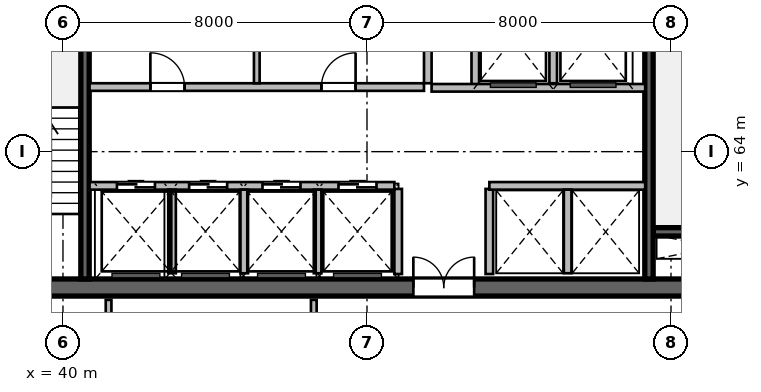
"""IFC4 building model, lengths in metres.
Left out: names, types, materials, properties, quantities, classifications, styles, units other than length and angle.
Written with IfcOpenShell. Run it as: python <this file> out.ifc"""

import sys

from ifc_helpers import new_model, si_unit, direction, frame, frame_2d, origin, place, context, subcontext, project, spatial, rectangle, extrude, source, transform, mapped, element, fill, save


model = new_model("IFC4")
c1 = context("Model", 3, precision=1e-05, world=origin(), true_north=direction((0.0, 1.0)))
c2 = subcontext(c1, "Body", "Model", "MODEL_VIEW")
j1 = project(units=[si_unit("LENGTHUNIT", "METRE"), si_unit("PLANEANGLEUNIT", "RADIAN")], contexts=[c1])
p1 = place(None, origin())
s1 = spatial("IfcSite", under=j1, at=p1, CompositionType="ELEMENT")
p2 = place(p1, origin())
s2 = spatial("IfcBuilding", under=s1, at=p2, CompositionType="ELEMENT")
p3 = place(p2, frame((0.0, 0.0, 246.9)))
s3 = spatial("IfcBuildingStorey", under=s2, at=p3, CompositionType="ELEMENT", Elevation=246.9)
m1 = source(origin(), c2, "Body", "SweptSolid", [
    extrude(rectangle(XDim=21.6, YDim=0.45, at=frame_2d((10.8, 0.0))), origin(), (0.0, 0.0, 1.0), 3.9),
])
p4 = place(p3, frame((37.2, 60.425, 0.0), z_axis=(0.0, 0.0, 1.0), x_axis=(1.0, 0.0, 0.0)))
e1 = element("IfcWall", 1, at=p4, inside=s3, PredefinedType="SHEAR", context=c2, shape_type="MappedRepresentation", body=[
    mapped(m1, transform((0.0, 0.0, 0.0), scale=1.0)),
])
p5 = place(p4, frame((1.1, 0.0, 0.0)))
e2 = element("IfcOpeningElement", 2, at=p5, cuts=e1, PredefinedType="OPENING", context=c2, shape_type="SweptSolid", body=[
    extrude(rectangle(XDim=1.15, YDim=2.15, at=frame_2d((0.575, 1.075))), frame((0.0, 0.235, 0.0), z_axis=(0.0, -1.0, 0.0), x_axis=(1.0, 0.0, 0.0)), (0.0, 0.0, 1.0), 0.47),
])
p6 = place(p4, frame((19.5, 0.0, 0.0)))
e3 = element("IfcOpeningElement", 3, at=p6, cuts=e1, PredefinedType="OPENING", context=c2, shape_type="SweptSolid", body=[
    extrude(rectangle(XDim=0.9, YDim=2.1, at=frame_2d((0.45, 1.05))), frame((0.0, 0.235, 0.0), z_axis=(0.0, -1.0, 0.0), x_axis=(1.0, 0.0, 0.0)), (0.0, 0.0, 1.0), 0.47),
])
p7 = place(p4, frame((12.02, 0.0, 0.0)))
e4 = element("IfcOpeningElement", 4, at=p7, cuts=e1, PredefinedType="OPENING", context=c2, shape_type="SweptSolid", body=[
    extrude(rectangle(XDim=1.6, YDim=2.15, at=frame_2d((0.8, 1.075))), frame((0.0, 0.235, 0.0), z_axis=(0.0, -1.0, 0.0), x_axis=(1.0, 0.0, 0.0)), (0.0, 0.0, 1.0), 0.47),
])
m2 = source(origin(), c2, "Body", "SweptSolid", [
    extrude(rectangle(XDim=3.27, YDim=0.22, at=frame_2d((1.635, 0.0))), origin(), (0.0, 0.0, 1.0), 3.9),
])
p8 = place(p3, frame((55.53, 61.89, 0.0), z_axis=(0.0, 0.0, 1.0), x_axis=(1.0, 0.0, 0.0)))
e5 = element("IfcWall", 5, at=p8, inside=s3, PredefinedType="SHEAR", context=c2, shape_type="MappedRepresentation", body=[
    mapped(m2, transform((0.0, 0.0, 0.0), scale=1.0)),
])
m3 = source(origin(), c2, "Body", "SweptSolid", [
    extrude(rectangle(XDim=11.1, YDim=0.22, at=frame_2d((5.55, 0.0))), origin(), (0.0, 0.0, 1.0), 3.9),
])
p9 = place(p3, frame((40.58, 60.65, 0.0), z_axis=(0.0, 0.0, 1.0), x_axis=(0.0, 1.0, 0.0)))
e6 = element("IfcWall", 6, at=p9, inside=s3, PredefinedType="SHEAR", context=c2, shape_type="MappedRepresentation", body=[
    mapped(m3, transform((0.0, 0.0, 0.0), scale=1.0)),
])
p10 = place(p3, frame((55.42, 60.65, 0.0), z_axis=(0.0, 0.0, 1.0), x_axis=(0.0, 1.0, 0.0)))
e7 = element("IfcWall", 7, at=p10, inside=s3, PredefinedType="SHEAR", context=c2, shape_type="MappedRepresentation", body=[
    mapped(m3, transform((0.0, 0.0, 0.0), scale=1.0)),
])
p11 = place(p10, frame((9.595, 0.0, 0.0)))
e8 = element("IfcOpeningElement", 8, at=p11, cuts=e7, PredefinedType="OPENING", context=c2, shape_type="SweptSolid", body=[
    extrude(rectangle(XDim=1.15, YDim=2.15, at=frame_2d((0.575, 1.075))), frame((0.0, 0.12, 0.0), z_axis=(0.0, -1.0, 0.0), x_axis=(1.0, 0.0, 0.0)), (0.0, 0.0, 1.0), 0.24),
])
m4 = source(origin(), c2, "Body", "SweptSolid", [
    extrude(rectangle(XDim=2.24, YDim=0.2, at=frame_2d((1.12, 0.0))), origin(), (0.0, 0.0, 1.0), 3.65),
])
for number, where, z_axis, x_axis in (
    (9, (48.82, 60.78, 0.0), (0.0, 0.0, 1.0), (0.0, 1.0, 0.0)),
    (10, (51.22, 60.78, 0.0), (0.0, 0.0, 1.0), (0.0, 1.0, 0.0)),
):
    element("IfcWall", number, at=place(p3, frame(where, z_axis=z_axis, x_axis=x_axis)), inside=s3, PredefinedType="SOLIDWALL", context=c2, shape_type="MappedRepresentation", body=[
        mapped(m4, transform((0.0, 0.0, 0.0), scale=1.0)),
    ])
m5 = source(origin(), c2, "Body", "SweptSolid", [
    extrude(rectangle(XDim=5.8, YDim=0.2, at=frame_2d((2.9, 0.0))), origin(), (0.0, 0.0, 1.0), 3.65),
])
p12 = place(p3, frame((49.6, 65.8, 0.0), z_axis=(0.0, 0.0, 1.0), x_axis=(0.0, 1.0, 0.0)))
e11 = element("IfcWall", 11, at=p12, inside=s3, PredefinedType="SOLIDWALL", context=c2, shape_type="MappedRepresentation", body=[
    mapped(m5, transform((0.0, 0.0, 0.0), scale=1.0)),
])
m6 = source(origin(), c2, "Body", "SweptSolid", [
    extrude(rectangle(XDim=2.58, YDim=0.2, at=frame_2d((1.29, 0.0))), origin(), (0.0, 0.0, 1.0), 3.65),
])
p13 = place(p3, frame((50.85, 65.68, 0.0), z_axis=(0.0, 0.0, 1.0), x_axis=(0.0, 1.0, 0.0)))
e12 = element("IfcWall", 12, at=p13, inside=s3, PredefinedType="SOLIDWALL", context=c2, shape_type="MappedRepresentation", body=[
    mapped(m6, transform((0.0, 0.0, 0.0), scale=1.0)),
])
m7 = source(origin(), c2, "Body", "SweptSolid", [
    extrude(rectangle(XDim=2.4, YDim=0.2, at=frame_2d((1.2, 0.0))), origin(), (0.0, 0.0, 1.0), 3.65),
])
p14 = place(p3, frame((52.9, 65.8, 0.0), z_axis=(0.0, 0.0, 1.0), x_axis=(0.0, 1.0, 0.0)))
e13 = element("IfcWall", 13, at=p14, inside=s3, PredefinedType="SOLIDWALL", context=c2, shape_type="MappedRepresentation", body=[
    mapped(m7, transform((0.0, 0.0, 0.0), scale=1.0)),
])
m8 = source(origin(), c2, "Body", "SweptSolid", [
    extrude(rectangle(XDim=5.62, YDim=0.2, at=frame_2d((2.81, 0.0))), origin(), (0.0, 0.0, 1.0), 3.65),
])
p15 = place(p3, frame((49.7, 65.68, 0.0), z_axis=(0.0, 0.0, 1.0), x_axis=(1.0, 0.0, 0.0)))
e14 = element("IfcWall", 14, at=p15, inside=s3, PredefinedType="SOLIDWALL", context=c2, shape_type="MappedRepresentation", body=[
    mapped(m8, transform((0.0, 0.0, 0.0), scale=1.0)),
])
m9 = source(origin(), c2, "Body", "SweptSolid", [
    extrude(rectangle(XDim=8.02, YDim=0.2, at=frame_2d((4.01, 0.0))), origin(), (0.0, 0.0, 1.0), 3.65),
])
p16 = place(p3, frame((40.7, 63.1, 0.0), z_axis=(0.0, 0.0, 1.0), x_axis=(1.0, 0.0, 0.0)))
e15 = element("IfcWall", 15, at=p16, inside=s3, PredefinedType="SOLIDWALL", context=c2, shape_type="MappedRepresentation", body=[
    mapped(m9, transform((0.0, 0.0, 0.0), scale=1.0)),
])
p17 = place(p16, frame((0.72, 0.0, 0.0)))
e16 = element("IfcOpeningElement", 16, at=p17, cuts=e15, PredefinedType="OPENING", context=c2, shape_type="SweptSolid", body=[
    extrude(rectangle(XDim=1.0, YDim=2.15, at=frame_2d((0.5, 1.075))), frame((0.0, 0.11, 0.0), z_axis=(0.0, -1.0, 0.0), x_axis=(1.0, 0.0, 0.0)), (0.0, 0.0, 1.0), 0.22),
])
p18 = place(p16, frame((2.62, 0.0, 0.0)))
e17 = element("IfcOpeningElement", 17, at=p18, cuts=e15, PredefinedType="OPENING", context=c2, shape_type="SweptSolid", body=[
    extrude(rectangle(XDim=1.0, YDim=2.15, at=frame_2d((0.5, 1.075))), frame((0.0, 0.11, 0.0), z_axis=(0.0, -1.0, 0.0), x_axis=(1.0, 0.0, 0.0)), (0.0, 0.0, 1.0), 0.22),
])
p19 = place(p16, frame((4.55, 0.0, 0.0)))
e18 = element("IfcOpeningElement", 18, at=p19, cuts=e15, PredefinedType="OPENING", context=c2, shape_type="SweptSolid", body=[
    extrude(rectangle(XDim=1.0, YDim=2.15, at=frame_2d((0.5, 1.075))), frame((0.0, 0.11, 0.0), z_axis=(0.0, -1.0, 0.0), x_axis=(1.0, 0.0, 0.0)), (0.0, 0.0, 1.0), 0.22),
])
p20 = place(p16, frame((6.55, 0.0, 0.0)))
e19 = element("IfcOpeningElement", 19, at=p20, cuts=e15, PredefinedType="OPENING", context=c2, shape_type="SweptSolid", body=[
    extrude(rectangle(XDim=1.0, YDim=2.15, at=frame_2d((0.5, 1.075))), frame((0.0, 0.11, 0.0), z_axis=(0.0, -1.0, 0.0), x_axis=(1.0, 0.0, 0.0)), (0.0, 0.0, 1.0), 0.22),
])
m10 = source(origin(), c2, "Body", "SweptSolid", [
    extrude(rectangle(XDim=4.1, YDim=0.2, at=frame_2d((2.05, 0.0))), origin(), (0.0, 0.0, 1.0), 3.65),
])
p21 = place(p3, frame((51.22, 63.1, 0.0), z_axis=(0.0, 0.0, 1.0), x_axis=(1.0, 0.0, 0.0)))
e20 = element("IfcWall", 20, at=p21, inside=s3, PredefinedType="SOLIDWALL", context=c2, shape_type="MappedRepresentation", body=[
    mapped(m10, transform((0.0, 0.0, 0.0), scale=1.0)),
])
m11 = source(origin(), c2, "Body", "SweptSolid", [
    extrude(rectangle(XDim=2.2, YDim=0.2, at=frame_2d((1.1, 0.0))), origin(), (0.0, 0.0, 1.0), 3.65),
])
for number, where, z_axis, x_axis in (
    (21, (42.87, 60.8, 0.0), (0.0, 0.0, 1.0), (0.0, 1.0, 0.0)),
    (22, (44.77, 60.8, 0.0), (0.0, 0.0, 1.0), (0.0, 1.0, 0.0)),
    (23, (46.7, 60.8, 0.0), (0.0, 0.0, 1.0), (0.0, 1.0, 0.0)),
    (24, (53.28, 60.8, 0.0), (0.0, 0.0, 1.0), (0.0, 1.0, 0.0)),
):
    element("IfcWall", number, at=place(p3, frame(where, z_axis=z_axis, x_axis=x_axis)), inside=s3, PredefinedType="SOLIDWALL", context=c2, shape_type="MappedRepresentation", body=[
        mapped(m11, transform((0.0, 0.0, 0.0), scale=1.0)),
    ])
m12 = source(origin(), c2, "Body", "SweptSolid", [
    extrude(rectangle(XDim=8.8, YDim=0.2, at=frame_2d((4.4, 0.0))), origin(), (0.0, 0.0, 1.0), 3.65),
])
p22 = place(p3, frame((40.7, 65.7, 0.0), z_axis=(0.0, 0.0, 1.0), x_axis=(1.0, 0.0, 0.0)))
e25 = element("IfcWall", 25, at=p22, inside=s3, PredefinedType="SOLIDWALL", context=c2, shape_type="MappedRepresentation", body=[
    mapped(m12, transform((0.0, 0.0, 0.0), scale=1.0)),
])
p23 = place(p22, frame((1.6, 0.0, 0.0)))
e26 = element("IfcOpeningElement", 26, at=p23, cuts=e25, PredefinedType="OPENING", context=c2, shape_type="SweptSolid", body=[
    extrude(rectangle(XDim=0.9, YDim=2.1, at=frame_2d((0.45, 1.05))), frame((0.0, 0.11, 0.0), z_axis=(0.0, -1.0, 0.0), x_axis=(1.0, 0.0, 0.0)), (0.0, 0.0, 1.0), 0.22),
])
p24 = place(p22, frame((6.1, 0.0, 0.0)))
e27 = element("IfcOpeningElement", 27, at=p24, cuts=e25, PredefinedType="OPENING", context=c2, shape_type="SweptSolid", body=[
    extrude(rectangle(XDim=0.9, YDim=2.1, at=frame_2d((0.45, 1.05))), frame((0.0, 0.11, 0.0), z_axis=(0.0, -1.0, 0.0), x_axis=(1.0, 0.0, 0.0)), (0.0, 0.0, 1.0), 0.22),
])
m13 = source(origin(), c2, "Body", "SweptSolid", [
    extrude(rectangle(XDim=2.4, YDim=0.15, at=frame_2d((1.2, 0.0))), origin(), (0.0, 0.0, 1.0), 3.65),
])
p25 = place(p3, frame((45.1, 65.8, 0.0), z_axis=(0.0, 0.0, 1.0), x_axis=(0.0, 1.0, 0.0)))
e28 = element("IfcWall", 28, at=p25, inside=s3, PredefinedType="PARTITIONING", context=c2, shape_type="MappedRepresentation", body=[
    mapped(m13, transform((0.0, 0.0, 0.0), scale=1.0)),
])
m14 = source(origin(), c2, "Body", "SweptSolid", [
    extrude(rectangle(XDim=2.033, YDim=0.15, at=frame_2d((1.016, 0.0))), origin(), (0.0, 0.0, 1.0), 3.65),
])
p26 = place(p3, frame((41.2, 58.067, 0.0), z_axis=(0.0, 0.0, 1.0), x_axis=(0.0, 1.0, 0.0)))
e29 = element("IfcWall", 29, at=p26, inside=s3, PredefinedType="PARTITIONING", context=c2, shape_type="MappedRepresentation", body=[
    mapped(m14, transform((0.0, 0.0, 0.0), scale=1.0)),
])
p27 = place(p26, frame((0.591, 0.0, 0.0)))
e30 = element("IfcOpeningElement", 30, at=p27, cuts=e29, PredefinedType="OPENING", context=c2, shape_type="SweptSolid", body=[
    extrude(rectangle(XDim=0.85, YDim=2.1, at=frame_2d((0.425, 1.05))), frame((0.0, 0.085, 0.0), z_axis=(0.0, -1.0, 0.0), x_axis=(1.0, 0.0, 0.0)), (0.0, 0.0, 1.0), 0.17),
])
p28 = place(p3, frame((46.6, 58.067, 0.0), z_axis=(0.0, 0.0, 1.0), x_axis=(0.0, 1.0, 0.0)))
e31 = element("IfcWall", 31, at=p28, inside=s3, PredefinedType="PARTITIONING", context=c2, shape_type="MappedRepresentation", body=[
    mapped(m14, transform((0.0, 0.0, 0.0), scale=1.0)),
])
m15 = source(origin(), c2, "Body", "SweptSolid", [
    extrude(rectangle(XDim=1.6, YDim=2.15, at=frame_2d((0.8, 1.075))), frame((0.0, 0.025, 0.0), z_axis=(0.0, -1.0, 0.0), x_axis=(1.0, 0.0, 0.0)), (0.0, 0.0, 1.0), 0.05),
])
p29 = place(p7, origin())
e32 = element("IfcDoor", 32, at=p29, inside=s3, OperationType="DOUBLE_DOOR_SINGLE_SWING", PredefinedType="DOOR", context=c2, shape_type="MappedRepresentation", body=[
    mapped(m15, transform((0.0, 0.0, 0.0), scale=1.0)),
])
fill(e4, e32)
m16 = source(origin(), c2, "Body", "SweptSolid", [
    extrude(rectangle(XDim=1.0, YDim=2.15, at=frame_2d((0.5, 1.075))), frame((0.0, 0.025, 0.0), z_axis=(0.0, -1.0, 0.0), x_axis=(1.0, 0.0, 0.0)), (0.0, 0.0, 1.0), 0.05),
])
p30 = place(p17, origin())
e33 = element("IfcDoor", 33, at=p30, inside=s3, OperationType="DOUBLE_DOOR_SLIDING", PredefinedType="DOOR", context=c2, shape_type="MappedRepresentation", body=[
    mapped(m16, transform((0.0, 0.0, 0.0), scale=1.0)),
])
fill(e16, e33)
p31 = place(p18, origin())
e34 = element("IfcDoor", 34, at=p31, inside=s3, OperationType="DOUBLE_DOOR_SLIDING", PredefinedType="DOOR", context=c2, shape_type="MappedRepresentation", body=[
    mapped(m16, transform((0.0, 0.0, 0.0), scale=1.0)),
])
fill(e17, e34)
p32 = place(p19, origin())
e35 = element("IfcDoor", 35, at=p32, inside=s3, OperationType="DOUBLE_DOOR_SLIDING", PredefinedType="DOOR", context=c2, shape_type="MappedRepresentation", body=[
    mapped(m16, transform((0.0, 0.0, 0.0), scale=1.0)),
])
fill(e18, e35)
p33 = place(p20, origin())
e36 = element("IfcDoor", 36, at=p33, inside=s3, OperationType="DOUBLE_DOOR_SLIDING", PredefinedType="DOOR", context=c2, shape_type="MappedRepresentation", body=[
    mapped(m16, transform((0.0, 0.0, 0.0), scale=1.0)),
])
fill(e19, e36)
m17 = source(origin(), c2, "Body", "SweptSolid", [
    extrude(rectangle(XDim=0.9, YDim=2.1, at=frame_2d((0.45, 1.05))), frame((0.0, 0.025, 0.0), z_axis=(0.0, -1.0, 0.0), x_axis=(1.0, 0.0, 0.0)), (0.0, 0.0, 1.0), 0.05),
])
p34 = place(p23, origin())
e37 = element("IfcDoor", 37, at=p34, inside=s3, OperationType="SINGLE_SWING_LEFT", PredefinedType="DOOR", context=c2, shape_type="MappedRepresentation", body=[
    mapped(m17, transform((0.0, 0.0, 0.0), scale=1.0)),
])
fill(e26, e37)
p35 = place(p24, origin())
e38 = element("IfcDoor", 38, at=p35, inside=s3, OperationType="SINGLE_SWING_RIGHT", PredefinedType="DOOR", context=c2, shape_type="MappedRepresentation", body=[
    mapped(m17, transform((0.0, 0.0, 0.0), scale=1.0)),
])
fill(e27, e38)
save(model, sys.argv[1])
